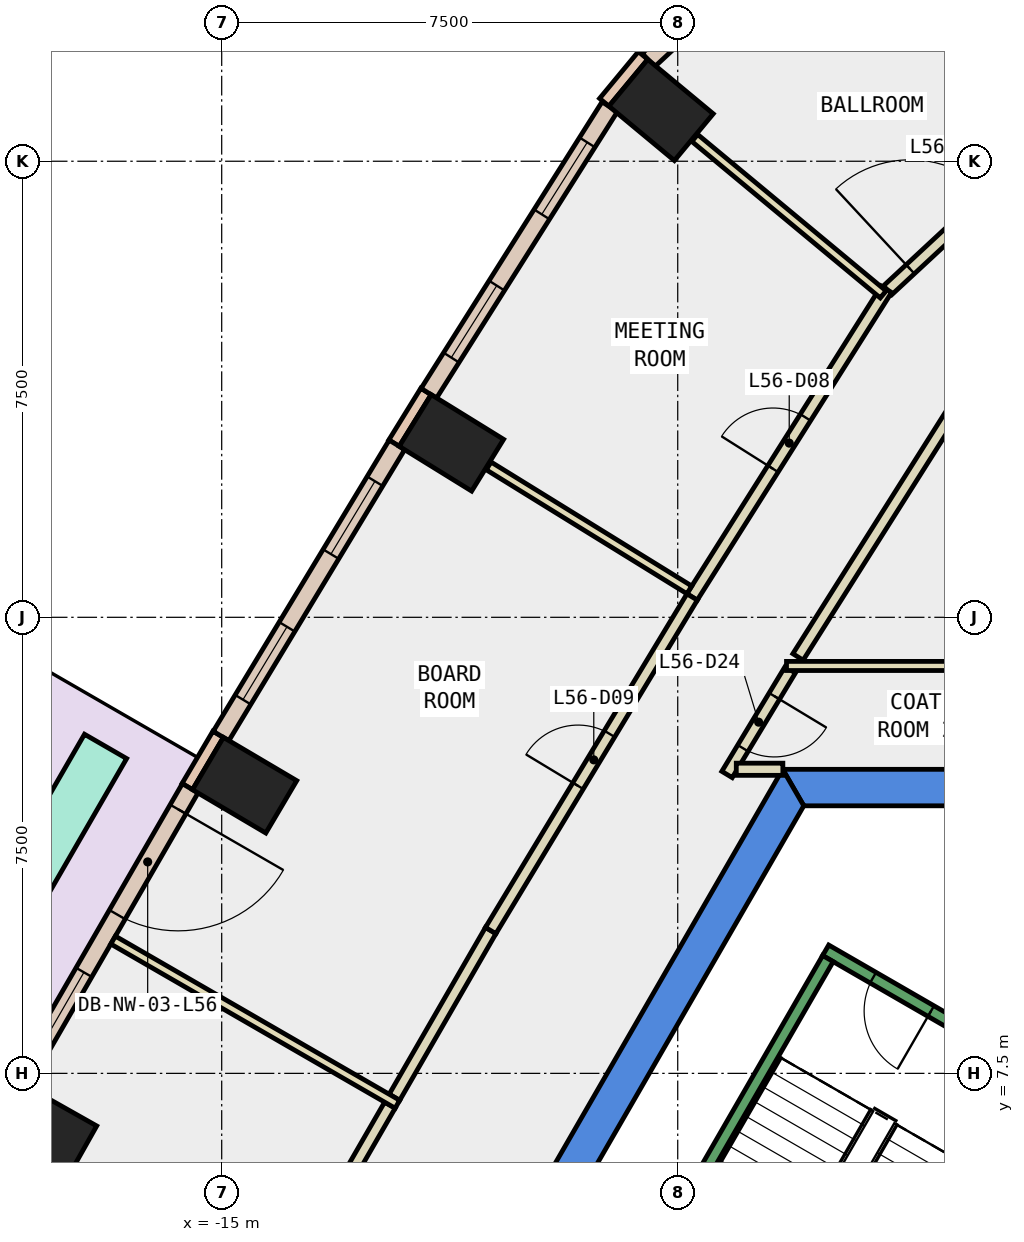
"""IFC4 building model, lengths in metres.
Left out: names, types, materials, properties, quantities, classifications, styles, units other than length and angle.
Written with IfcOpenShell. Run it as: python <this file> out.ifc"""

import sys

from ifc_helpers import new_model, si_unit, direction, frame, frame_2d, origin, origin_2d, place, context, subcontext, project, spatial, polyline, rectangle, outline, extrude, element, fill, save


model = new_model("IFC4")
c1 = context("Model", 3, precision=1e-05, world=origin(), true_north=direction((0.0, 1.0)))
c2 = subcontext(c1, "Body", "Model", "MODEL_VIEW")
j1 = project(units=[si_unit("LENGTHUNIT", "METRE"), si_unit("PLANEANGLEUNIT", "RADIAN")], contexts=[c1])
p1 = place(None, origin())
s1 = spatial("IfcSite", under=j1, at=p1, CompositionType="ELEMENT")
p2 = place(p1, origin())
s2 = spatial("IfcBuilding", under=s1, at=p2, CompositionType="ELEMENT")
p3 = place(p2, frame((0.0, 0.0, 248.6)))
s3 = spatial("IfcBuildingStorey", under=s2, at=p3, CompositionType="ELEMENT", Elevation=248.6)
for number, where, z_axis, x_axis in (
    (1, (-7.774, 23.343, -0.34), (0.0, 0.0, 1.0), (0.639, 0.769, 0.0)),
    (2, (-11.222, 17.869, -0.34), (0.0, 0.0, 1.0), (0.526, 0.851, 0.0)),
    (3, (-14.623, 12.239, -0.34), (0.0, 0.0, 1.0), (0.509, 0.861, 0.0)),
    (4, (-17.911, 6.544, -0.34), (0.0, 0.0, 1.0), (0.491, 0.871, 0.0)),
):
    element("IfcColumn", number, at=place(p3, frame(where, z_axis=z_axis, x_axis=x_axis)), inside=s3, PredefinedType="COLUMN", context=c2, shape_type="SweptSolid", body=[
        extrude(rectangle(XDim=1.0, YDim=1.4, at=origin_2d()), origin(), (0.0, 0.0, 1.0), 3.6),
    ])
p4 = place(p3, frame((0.0, 0.0, -0.34)))
e5 = element("IfcWall", 5, at=p4, inside=s3, PredefinedType="SHEAR", context=c2, shape_type="SweptSolid", body=[
    extrude(outline(polyline([(5.774, 12.5), (-5.774, 12.5), (-5.427, 11.9), (5.427, 11.9), (5.774, 12.5)])), origin(), (0.0, 0.0, 1.0), 3.6),
])
p5 = place(p3, frame((0.0, 0.0, -0.34)))
e6 = element("IfcWall", 6, at=p5, inside=s3, PredefinedType="SHEAR", context=c2, shape_type="SweptSolid", body=[
    extrude(outline(polyline([(-10.535, 4.253), (-10.015, 3.953), (-5.427, 11.9), (-5.774, 12.5), (-10.535, 4.253)])), origin(), (0.0, 0.0, 1.0), 3.6),
])
p6 = place(p3, frame((-8.07, 24.239, 0.0), z_axis=(0.0, 0.0, 1.0), x_axis=(-0.637972365578, -0.770059257953, 0.0)))
e7 = element("IfcWall", 7, at=p6, inside=s3, PredefinedType="STANDARD", context=c2, shape_type="SweptSolid", body=[
    extrude(rectangle(XDim=1.0, YDim=0.2, at=frame_2d((0.5, 0.0))), origin(), (0.0, 0.0, 1.0), 3.26),
])
p7 = place(p3, frame((-11.64, 18.715, 0.0), z_axis=(0.0, 0.0, 1.0), x_axis=(-0.525825307325, -0.850592585306, 0.0)))
e8 = element("IfcWall", 8, at=p7, inside=s3, PredefinedType="STANDARD", context=c2, shape_type="SweptSolid", body=[
    extrude(rectangle(XDim=1.0, YDim=0.2, at=frame_2d((0.5, 0.0))), origin(), (0.0, 0.0, 1.0), 3.26),
])
p8 = place(p3, frame((-15.058, 13.077, 0.0), z_axis=(0.0, 0.0, 1.0), x_axis=(-0.508087253435, -0.86130560366, 0.0)))
e9 = element("IfcWall", 9, at=p8, inside=s3, PredefinedType="STANDARD", context=c2, shape_type="SweptSolid", body=[
    extrude(rectangle(XDim=1.0, YDim=0.2, at=frame_2d((0.5, 0.0))), origin(), (0.0, 0.0, 1.0), 3.26),
])
p9 = place(p3, frame((-5.123, 26.816, 0.0), z_axis=(0.0, 0.0, 1.0), x_axis=(-0.733038780179, -0.680186846942, 0.0)))
e10 = element("IfcWall", 10, at=p9, inside=s3, PredefinedType="STANDARD", context=c2, shape_type="SweptSolid", body=[
    extrude(rectangle(XDim=3.899, YDim=0.3, at=frame_2d((1.949, 0.0))), origin(), (0.0, 0.0, 1.0), 3.26),
])
p10 = place(p9, frame((1.249, 0.0, 0.9)))
e11 = element("IfcOpeningElement", 11, at=p10, cuts=e10, PredefinedType="OPENING", context=c2, shape_type="SweptSolid", body=[
    extrude(rectangle(XDim=1.4, YDim=2.0, at=frame_2d((0.7, 1.0))), frame((0.0, 0.16, 0.0), z_axis=(0.0, -1.0, 0.0), x_axis=(1.0, 0.0, 0.0)), (0.0, 0.0, 1.0), 0.32),
])
p11 = place(p3, frame((-8.618, 23.396, 0.0), z_axis=(0.0, 0.0, 1.0), x_axis=(-0.534088597203, -0.845428512849, 0.0)))
e12 = element("IfcWall", 12, at=p11, inside=s3, PredefinedType="STANDARD", context=c2, shape_type="SweptSolid", body=[
    extrude(rectangle(XDim=5.572, YDim=0.3, at=frame_2d((2.786, 0.0))), origin(), (0.0, 0.0, 1.0), 3.26),
])
p12 = place(p11, frame((0.693, 0.0, 0.9)))
e13 = element("IfcOpeningElement", 13, at=p12, cuts=e12, PredefinedType="OPENING", context=c2, shape_type="SweptSolid", body=[
    extrude(rectangle(XDim=1.4, YDim=2.0, at=frame_2d((0.7, 1.0))), frame((0.0, 0.16, 0.0), z_axis=(0.0, -1.0, 0.0), x_axis=(1.0, 0.0, 0.0)), (0.0, 0.0, 1.0), 0.32),
])
p13 = place(p11, frame((3.479, 0.0, 0.9)))
e14 = element("IfcOpeningElement", 14, at=p13, cuts=e12, PredefinedType="OPENING", context=c2, shape_type="SweptSolid", body=[
    extrude(rectangle(XDim=1.4, YDim=2.0, at=frame_2d((0.7, 1.0))), frame((0.0, 0.16, 0.0), z_axis=(0.0, -1.0, 0.0), x_axis=(1.0, 0.0, 0.0)), (0.0, 0.0, 1.0), 0.32),
])
p14 = place(p3, frame((-12.118, 17.836, 0.0), z_axis=(0.0, 0.0, 1.0), x_axis=(-0.517169592475, -0.855882943293, 0.0)))
e15 = element("IfcWall", 15, at=p14, inside=s3, PredefinedType="STANDARD", context=c2, shape_type="SweptSolid", body=[
    extrude(rectangle(XDim=5.594, YDim=0.3, at=frame_2d((2.797, 0.0))), origin(), (0.0, 0.0, 1.0), 3.26),
])
p15 = place(p14, frame((0.699, 0.0, 0.9)))
e16 = element("IfcOpeningElement", 16, at=p15, cuts=e15, PredefinedType="OPENING", context=c2, shape_type="SweptSolid", body=[
    extrude(rectangle(XDim=1.4, YDim=2.0, at=frame_2d((0.7, 1.0))), frame((0.0, 0.16, 0.0), z_axis=(0.0, -1.0, 0.0), x_axis=(1.0, 0.0, 0.0)), (0.0, 0.0, 1.0), 0.32),
])
p16 = place(p14, frame((3.496, 0.0, 0.9)))
e17 = element("IfcOpeningElement", 17, at=p16, cuts=e15, PredefinedType="OPENING", context=c2, shape_type="SweptSolid", body=[
    extrude(rectangle(XDim=1.4, YDim=2.0, at=frame_2d((0.7, 1.0))), frame((0.0, 0.16, 0.0), z_axis=(0.0, -1.0, 0.0), x_axis=(1.0, 0.0, 0.0)), (0.0, 0.0, 1.0), 0.32),
])
p17 = place(p3, frame((-15.518, 12.189, 0.0), z_axis=(0.0, 0.0, 1.0), x_axis=(-0.49995037644, -0.866054052065, 0.0)))
e18 = element("IfcWall", 18, at=p17, inside=s3, PredefinedType="STANDARD", context=c2, shape_type="SweptSolid", body=[
    extrude(rectangle(XDim=5.594, YDim=0.3, at=frame_2d((2.797, 0.0))), origin(), (0.0, 0.0, 1.0), 3.26),
])
p18 = place(p17, frame((0.399, 0.0, 0.0)))
e19 = element("IfcOpeningElement", 19, at=p18, cuts=e18, PredefinedType="OPENING", context=c2, shape_type="SweptSolid", body=[
    extrude(rectangle(XDim=2.0, YDim=2.4, at=frame_2d((1.0, 1.2))), frame((0.0, 0.16, 0.0), z_axis=(0.0, -1.0, 0.0), x_axis=(1.0, 0.0, 0.0)), (0.0, 0.0, 1.0), 0.32),
])
p19 = place(p17, frame((3.496, 0.0, 0.9)))
e20 = element("IfcOpeningElement", 20, at=p19, cuts=e18, PredefinedType="OPENING", context=c2, shape_type="SweptSolid", body=[
    extrude(rectangle(XDim=1.4, YDim=2.0, at=frame_2d((0.7, 1.0))), frame((0.0, 0.16, 0.0), z_axis=(0.0, -1.0, 0.0), x_axis=(1.0, 0.0, 0.0)), (0.0, 0.0, 1.0), 0.32),
])
p20 = place(p3, frame((-16.91, 12.877, 0.0), z_axis=(0.0, 0.0, 1.0), x_axis=(-0.500038519147, -0.866003163602, 0.0)))
e21 = element("IfcWall", 21, at=p20, inside=s3, PredefinedType="STANDARD", context=c2, shape_type="SweptSolid", body=[
    extrude(rectangle(XDim=5.394, YDim=0.8, at=frame_2d((2.697, 0.0))), origin(), (0.0, 0.0, 1.0), 0.8),
])
p21 = place(p3, frame((-5.65, 14.136, 0.0), z_axis=(0.0, 0.0, 1.0), x_axis=(-0.516869099034, -0.856064445275, 0.0)))
e22 = element("IfcWall", 22, at=p21, inside=s3, PredefinedType="PARTITIONING", context=c2, shape_type="SweptSolid", body=[
    extrude(rectangle(XDim=2.01, YDim=0.2, at=frame_2d((1.005, 0.0))), origin(), (0.0, 0.0, 1.0), 3.26),
])
p22 = place(p21, frame((0.505, 0.0, 0.0)))
e23 = element("IfcOpeningElement", 23, at=p22, cuts=e22, PredefinedType="OPENING", context=c2, shape_type="SweptSolid", body=[
    extrude(rectangle(XDim=1.0, YDim=2.1, at=frame_2d((0.5, 1.05))), frame((0.0, 0.11, 0.0), z_axis=(0.0, -1.0, 0.0), x_axis=(1.0, 0.0, 0.0)), (0.0, 0.0, 1.0), 0.22),
])
p23 = place(p3, frame((-6.537, 12.501, 0.0), z_axis=(0.0, 0.0, 1.0), x_axis=(1.0, 0.0, 0.0)))
e24 = element("IfcWall", 24, at=p23, inside=s3, PredefinedType="PARTITIONING", context=c2, shape_type="SweptSolid", body=[
    extrude(rectangle(XDim=0.766, YDim=0.2, at=frame_2d((0.383, 0.0))), origin(), (0.0, 0.0, 1.0), 3.26),
])
p24 = place(p3, frame((-2.516, 19.106, 0.0), z_axis=(0.0, 0.0, 1.0), x_axis=(-0.534090914267, -0.845427049069, 0.0)))
e25 = element("IfcWall", 25, at=p24, inside=s3, PredefinedType="PARTITIONING", context=c2, shape_type="SweptSolid", body=[
    extrude(rectangle(XDim=5.628, YDim=0.2, at=frame_2d((2.814, 0.0))), origin(), (0.0, 0.0, 1.0), 3.26),
])
p25 = place(p3, frame((-4.048, 20.378, 0.0), z_axis=(0.0, 0.0, 1.0), x_axis=(0.732913830966, 0.680321480169, 0.0)))
e26 = element("IfcWall", 26, at=p25, inside=s3, PredefinedType="PARTITIONING", context=c2, shape_type="SweptSolid", body=[
    extrude(rectangle(XDim=2.818, YDim=0.2, at=frame_2d((1.409, 0.0))), origin(), (0.0, 0.0, 1.0), 3.26),
])
p26 = place(p25, frame((0.509, 0.0, 0.0)))
e27 = element("IfcOpeningElement", 27, at=p26, cuts=e26, PredefinedType="OPENING", context=c2, shape_type="SweptSolid", body=[
    extrude(rectangle(XDim=1.8, YDim=2.1, at=frame_2d((0.9, 1.05))), frame((0.0, 0.11, 0.0), z_axis=(0.0, -1.0, 0.0), x_axis=(1.0, 0.0, 0.0)), (0.0, 0.0, 1.0), 0.22),
])
p27 = place(p3, frame((-7.264, 15.335, 0.0), z_axis=(0.0, 0.0, 1.0), x_axis=(0.533989921757, 0.845490841737, 0.0)))
e28 = element("IfcWall", 28, at=p27, inside=s3, PredefinedType="PARTITIONING", context=c2, shape_type="SweptSolid", body=[
    extrude(rectangle(XDim=5.985, YDim=0.2, at=frame_2d((2.992, 0.0))), origin(), (0.0, 0.0, 1.0), 3.26),
])
p28 = place(p27, frame((2.492, 0.0, 0.0)))
e29 = element("IfcOpeningElement", 29, at=p28, cuts=e28, PredefinedType="OPENING", context=c2, shape_type="SweptSolid", body=[
    extrude(rectangle(XDim=1.0, YDim=2.1, at=frame_2d((0.5, 1.05))), frame((0.0, 0.11, 0.0), z_axis=(0.0, -1.0, 0.0), x_axis=(1.0, 0.0, 0.0)), (0.0, 0.0, 1.0), 0.22),
])
p29 = place(p3, frame((-12.159, 7.107, 0.0), z_axis=(0.0, 0.0, 1.0), x_axis=(0.499953838557, 0.866052053466, 0.0)))
e30 = element("IfcWall", 30, at=p29, inside=s3, PredefinedType="PARTITIONING", context=c2, shape_type="SweptSolid", body=[
    extrude(rectangle(XDim=3.166, YDim=0.2, at=frame_2d((1.583, 0.0))), origin(), (0.0, 0.0, 1.0), 3.26),
])
p30 = place(p3, frame((-10.576, 9.849, 0.0), z_axis=(0.0, 0.0, 1.0), x_axis=(0.517026085378, 0.855969641423, 0.0)))
e31 = element("IfcWall", 31, at=p30, inside=s3, PredefinedType="PARTITIONING", context=c2, shape_type="SweptSolid", body=[
    extrude(rectangle(XDim=6.408, YDim=0.2, at=frame_2d((3.204, 0.0))), origin(), (0.0, 0.0, 1.0), 3.26),
])
p31 = place(p30, frame((2.779, 0.0, 0.0)))
e32 = element("IfcOpeningElement", 32, at=p31, cuts=e31, PredefinedType="OPENING", context=c2, shape_type="SweptSolid", body=[
    extrude(rectangle(XDim=1.0, YDim=2.1, at=frame_2d((0.5, 1.05))), frame((0.0, 0.11, 0.0), z_axis=(0.0, -1.0, 0.0), x_axis=(1.0, 0.0, 0.0)), (0.0, 0.0, 1.0), 0.22),
])
p32 = place(p3, frame((-13.817, 4.234, 0.0), z_axis=(0.0, 0.0, 1.0), x_axis=(0.499820325382, 0.866129114125, 0.0)))
e33 = element("IfcWall", 33, at=p32, inside=s3, PredefinedType="PARTITIONING", context=c2, shape_type="SweptSolid", body=[
    extrude(rectangle(XDim=3.167, YDim=0.2, at=frame_2d((1.583, 0.0))), origin(), (0.0, 0.0, 1.0), 3.26),
])
p33 = place(p3, frame((-1.457, 14.2, 0.0), z_axis=(0.0, 0.0, 1.0), x_axis=(-1.0, 0.0, 0.0)))
e34 = element("IfcWall", 34, at=p33, inside=s3, PredefinedType="PARTITIONING", context=c2, shape_type="SweptSolid", body=[
    extrude(rectangle(XDim=4.254, YDim=0.15, at=frame_2d((2.127, 0.0))), origin(), (0.0, 0.0, 1.0), 3.26),
])
p34 = place(p3, frame((-4.121, 20.31, 0.0), z_axis=(0.0, 0.0, 1.0), x_axis=(-0.769367727798, 0.638806151679, 0.0)))
e35 = element("IfcWall", 35, at=p34, inside=s3, PredefinedType="PARTITIONING", context=c2, shape_type="SweptSolid", body=[
    extrude(rectangle(XDim=4.028, YDim=0.15, at=frame_2d((2.014, 0.0))), origin(), (0.0, 0.0, 1.0), 3.26),
])
p35 = place(p3, frame((-7.309, 15.451, 0.0), z_axis=(0.0, 0.0, 1.0), x_axis=(-0.850775656528, 0.525529049872, 0.0)))
e36 = element("IfcWall", 36, at=p35, inside=s3, PredefinedType="PARTITIONING", context=c2, shape_type="SweptSolid", body=[
    extrude(rectangle(XDim=3.88, YDim=0.15, at=frame_2d((1.94, 0.0))), origin(), (0.0, 0.0, 1.0), 3.26),
])
p36 = place(p3, frame((-12.11, 6.992, 0.0), z_axis=(0.0, 0.0, 1.0), x_axis=(-0.865994316829, 0.50005384032, 0.0)))
e37 = element("IfcWall", 37, at=p36, inside=s3, PredefinedType="PARTITIONING", context=c2, shape_type="SweptSolid", body=[
    extrude(rectangle(XDim=5.399, YDim=0.15, at=frame_2d((2.7, 0.0))), origin(), (0.0, 0.0, 1.0), 3.26),
])
p37 = place(p3, frame((-1.256, 7.324, 0.0), z_axis=(0.0, 0.0, 1.0), x_axis=(-0.866046073146, 0.499964197906, 0.0)))
e38 = element("IfcWall", 38, at=p37, inside=s3, PredefinedType="STANDARD", context=c2, shape_type="SweptSolid", body=[
    extrude(rectangle(XDim=4.4, YDim=0.2, at=frame_2d((2.2, 0.0))), origin(), (0.0, 0.0, 1.0), 3.26),
])
p38 = place(p37, frame((2.4, 0.0, 0.0)))
e39 = element("IfcOpeningElement", 39, at=p38, cuts=e38, PredefinedType="OPENING", context=c2, shape_type="SweptSolid", body=[
    extrude(rectangle(XDim=1.1, YDim=2.2, at=frame_2d((0.55, 1.1))), frame((0.0, 0.11, 0.0), z_axis=(0.0, -1.0, 0.0), x_axis=(1.0, 0.0, 0.0)), (0.0, 0.0, 1.0), 0.22),
])
p39 = place(p3, frame((-1.393, 7.288, 0.0), z_axis=(0.0, 0.0, 1.0), x_axis=(-0.499963383562, -0.866046543262, 0.0)))
e40 = element("IfcWall", 40, at=p39, inside=s3, PredefinedType="STANDARD", context=c2, shape_type="SweptSolid", body=[
    extrude(rectangle(XDim=6.9, YDim=0.2, at=frame_2d((3.45, 0.0))), origin(), (0.0, 0.0, 1.0), 3.26),
])
p40 = place(p39, frame((0.45, 0.0, 0.0)))
e41 = element("IfcOpeningElement", 41, at=p40, cuts=e40, PredefinedType="OPENING", context=c2, shape_type="SweptSolid", body=[
    extrude(rectangle(XDim=1.1, YDim=2.2, at=frame_2d((0.55, 1.1))), frame((0.0, 0.11, 0.0), z_axis=(0.0, -1.0, 0.0), x_axis=(1.0, 0.0, 0.0)), (0.0, 0.0, 1.0), 0.22),
])
p41 = place(p3, frame((-5.03, 9.388, 0.0), z_axis=(0.0, 0.0, 1.0), x_axis=(-0.499978703459, -0.866037698999, 0.0)))
e42 = element("IfcWall", 42, at=p41, inside=s3, PredefinedType="STANDARD", context=c2, shape_type="SweptSolid", body=[
    extrude(rectangle(XDim=6.9, YDim=0.2, at=frame_2d((3.45, 0.0))), origin(), (0.0, 0.0, 1.0), 3.26),
])
p42 = place(p12, origin())
e43 = element("IfcWindow", 43, at=p42, inside=s3, PartitioningType="SINGLE_PANEL", PredefinedType="WINDOW", context=c2, shape_type="SweptSolid", body=[
    extrude(rectangle(XDim=1.4, YDim=2.0, at=frame_2d((0.7, 1.0))), frame((0.0, 0.03, 0.0), z_axis=(0.0, -1.0, 0.0), x_axis=(1.0, 0.0, 0.0)), (0.0, 0.0, 1.0), 0.06),
])
fill(e13, e43)
p43 = place(p13, origin())
e44 = element("IfcWindow", 44, at=p43, inside=s3, PartitioningType="SINGLE_PANEL", PredefinedType="WINDOW", context=c2, shape_type="SweptSolid", body=[
    extrude(rectangle(XDim=1.4, YDim=2.0, at=frame_2d((0.7, 1.0))), frame((0.0, 0.03, 0.0), z_axis=(0.0, -1.0, 0.0), x_axis=(1.0, 0.0, 0.0)), (0.0, 0.0, 1.0), 0.06),
])
fill(e14, e44)
p44 = place(p15, origin())
e45 = element("IfcWindow", 45, at=p44, inside=s3, PartitioningType="SINGLE_PANEL", PredefinedType="WINDOW", context=c2, shape_type="SweptSolid", body=[
    extrude(rectangle(XDim=1.4, YDim=2.0, at=frame_2d((0.7, 1.0))), frame((0.0, 0.03, 0.0), z_axis=(0.0, -1.0, 0.0), x_axis=(1.0, 0.0, 0.0)), (0.0, 0.0, 1.0), 0.06),
])
fill(e16, e45)
p45 = place(p16, origin())
e46 = element("IfcWindow", 46, at=p45, inside=s3, PartitioningType="SINGLE_PANEL", PredefinedType="WINDOW", context=c2, shape_type="SweptSolid", body=[
    extrude(rectangle(XDim=1.4, YDim=2.0, at=frame_2d((0.7, 1.0))), frame((0.0, 0.03, 0.0), z_axis=(0.0, -1.0, 0.0), x_axis=(1.0, 0.0, 0.0)), (0.0, 0.0, 1.0), 0.06),
])
fill(e17, e46)
p46 = place(p18, origin())
e47 = element("IfcDoor", 47, at=p46, inside=s3, OperationType="SLIDING_TO_LEFT", PredefinedType="DOOR", context=c2, shape_type="SweptSolid", body=[
    extrude(rectangle(XDim=2.0, YDim=2.4, at=frame_2d((1.0, 1.2))), frame((0.0, 0.025, 0.0), z_axis=(0.0, -1.0, 0.0), x_axis=(1.0, 0.0, 0.0)), (0.0, 0.0, 1.0), 0.05),
])
fill(e19, e47)
p47 = place(p19, origin())
e48 = element("IfcWindow", 48, at=p47, inside=s3, PartitioningType="SINGLE_PANEL", PredefinedType="WINDOW", context=c2, shape_type="SweptSolid", body=[
    extrude(rectangle(XDim=1.4, YDim=2.0, at=frame_2d((0.7, 1.0))), frame((0.0, 0.03, 0.0), z_axis=(0.0, -1.0, 0.0), x_axis=(1.0, 0.0, 0.0)), (0.0, 0.0, 1.0), 0.06),
])
fill(e20, e48)
p48 = place(p26, origin())
e49 = element("IfcDoor", 49, at=p48, inside=s3, OperationType="DOUBLE_DOOR_SINGLE_SWING", PredefinedType="DOOR", context=c2, shape_type="SweptSolid", body=[
    extrude(rectangle(XDim=1.8, YDim=2.1, at=frame_2d((0.9, 1.05))), frame((0.0, 0.025, 0.0), z_axis=(0.0, -1.0, 0.0), x_axis=(1.0, 0.0, 0.0)), (0.0, 0.0, 1.0), 0.05),
])
fill(e27, e49)
p49 = place(p28, origin())
e50 = element("IfcDoor", 50, at=p49, inside=s3, OperationType="SINGLE_SWING_LEFT", PredefinedType="DOOR", context=c2, shape_type="SweptSolid", body=[
    extrude(rectangle(XDim=1.0, YDim=2.1, at=frame_2d((0.5, 1.05))), frame((0.0, 0.025, 0.0), z_axis=(0.0, -1.0, 0.0), x_axis=(1.0, 0.0, 0.0)), (0.0, 0.0, 1.0), 0.05),
])
fill(e29, e50)
p50 = place(p31, origin())
e51 = element("IfcDoor", 51, at=p50, inside=s3, OperationType="SINGLE_SWING_LEFT", PredefinedType="DOOR", context=c2, shape_type="SweptSolid", body=[
    extrude(rectangle(XDim=1.0, YDim=2.1, at=frame_2d((0.5, 1.05))), frame((0.0, 0.025, 0.0), z_axis=(0.0, -1.0, 0.0), x_axis=(1.0, 0.0, 0.0)), (0.0, 0.0, 1.0), 0.05),
])
fill(e32, e51)
p51 = place(p22, origin())
e52 = element("IfcDoor", 52, at=p51, inside=s3, OperationType="SINGLE_SWING_LEFT", PredefinedType="DOOR", context=c2, shape_type="SweptSolid", body=[
    extrude(rectangle(XDim=1.0, YDim=2.1, at=frame_2d((0.5, 1.05))), frame((0.0, 0.025, 0.0), z_axis=(0.0, -1.0, 0.0), x_axis=(1.0, 0.0, 0.0)), (0.0, 0.0, 1.0), 0.05),
])
fill(e23, e52)
p52 = place(p38, origin())
e53 = element("IfcDoor", 53, at=p52, inside=s3, OperationType="SINGLE_SWING_LEFT", PredefinedType="DOOR", context=c2, shape_type="SweptSolid", body=[
    extrude(rectangle(XDim=1.1, YDim=2.2, at=frame_2d((0.55, 1.1))), frame((0.0, 0.025, 0.0), z_axis=(0.0, -1.0, 0.0), x_axis=(1.0, 0.0, 0.0)), (0.0, 0.0, 1.0), 0.05),
])
fill(e39, e53)
save(model, sys.argv[1])
